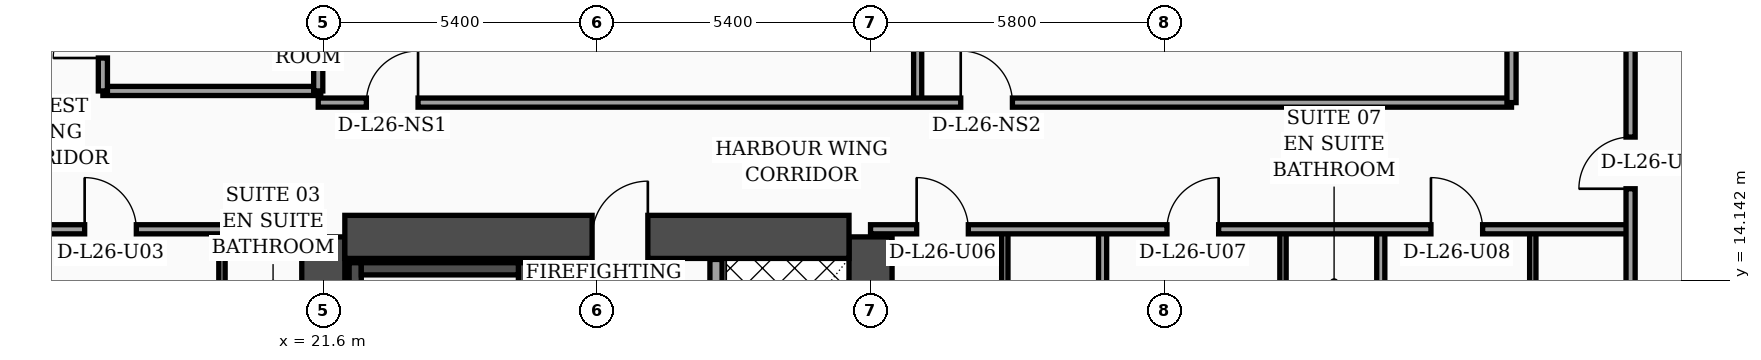
"""IFC4 building model, lengths in metres.
Left out: names, types, materials, properties, quantities, classifications, styles, units other than length and angle.
Written with IfcOpenShell. Run it as: python <this file> out.ifc"""

import sys

from ifc_helpers import new_model, si_unit, direction, frame, frame_2d, origin, place, context, subcontext, project, spatial, rectangle, extrude, element, fill, save


model = new_model("IFC4")
c1 = context("Model", 3, precision=1e-05, world=origin(), true_north=direction((0.0, 1.0)))
c2 = subcontext(c1, "Body", "Model", "MODEL_VIEW")
j1 = project(units=[si_unit("LENGTHUNIT", "METRE"), si_unit("PLANEANGLEUNIT", "RADIAN")], contexts=[c1])
p1 = place(None, origin())
s1 = spatial("IfcSite", under=j1, at=p1, CompositionType="ELEMENT")
p2 = place(p1, origin())
s2 = spatial("IfcBuilding", under=s1, at=p2, CompositionType="ELEMENT")
p3 = place(p2, frame((0.0, 0.0, 108.8)))
s3 = spatial("IfcBuildingStorey", under=s2, at=p3, CompositionType="ELEMENT", Elevation=108.8)
for number, where, z_axis, x_axis in (
    (1, (21.6, 4.6, 0.0), (0.0, 0.0, 1.0), (0.0, 1.0, 0.0)),
    (2, (32.4, 4.6, 0.0), (0.0, 0.0, 1.0), (0.0, 1.0, 0.0)),
):
    element("IfcWall", number, at=place(p3, frame(where, z_axis=z_axis, x_axis=x_axis)), inside=s3, PredefinedType="SHEAR", context=c2, shape_type="SweptSolid", body=[
        extrude(rectangle(XDim=10.4, YDim=0.85, at=frame_2d((5.2, 0.0))), origin(), (0.0, 0.0, 1.0), 3.56),
    ])
p4 = place(p3, frame((22.025, 15.0, 0.0), z_axis=(0.0, 0.0, 1.0), x_axis=(1.0, 0.0, 0.0)))
e3 = element("IfcWall", 3, at=p4, inside=s3, PredefinedType="SHEAR", context=c2, shape_type="SweptSolid", body=[
    extrude(rectangle(XDim=9.95, YDim=0.85, at=frame_2d((4.975, 0.0))), origin(), (0.0, 0.0, 1.0), 3.56),
])
p5 = place(p4, frame((4.88, 0.0, 0.0)))
e4 = element("IfcOpeningElement", 4, at=p5, cuts=e3, PredefinedType="OPENING", context=c2, shape_type="SweptSolid", body=[
    extrude(rectangle(XDim=1.1, YDim=2.2, at=frame_2d((0.55, 1.1))), frame((0.0, 0.435, 0.0), z_axis=(0.0, -1.0, 0.0), x_axis=(1.0, 0.0, 0.0)), (0.0, 0.0, 1.0), 0.87),
])
p6 = place(p3, frame((22.23, 5.025, 0.0), z_axis=(0.0, 0.0, 1.0), x_axis=(0.0, 1.0, 0.0)))
e5 = element("IfcWall", 5, at=p6, inside=s3, PredefinedType="SOLIDWALL", context=c2, shape_type="SweptSolid", body=[
    extrude(rectangle(XDim=9.465, YDim=0.24, at=frame_2d((4.732, 0.0))), origin(), (0.0, 0.0, 1.0), 3.56),
])
p7 = place(p3, frame((25.57, 5.025, 0.0), z_axis=(0.0, 0.0, 1.0), x_axis=(0.0, 1.0, 0.0)))
e6 = element("IfcWall", 6, at=p7, inside=s3, PredefinedType="SOLIDWALL", context=c2, shape_type="SweptSolid", body=[
    extrude(rectangle(XDim=9.465, YDim=0.24, at=frame_2d((4.732, 0.0))), origin(), (0.0, 0.0, 1.0), 3.56),
])
p8 = place(p7, frame((0.35, 0.0, 0.0)))
e7 = element("IfcOpeningElement", 7, at=p8, cuts=e6, PredefinedType="OPENING", context=c2, shape_type="SweptSolid", body=[
    extrude(rectangle(XDim=1.15, YDim=2.2, at=frame_2d((0.575, 1.1))), frame((0.0, 0.13, 0.0), z_axis=(0.0, -1.0, 0.0), x_axis=(1.0, 0.0, 0.0)), (0.0, 0.0, 1.0), 0.26),
])
p9 = place(p3, frame((22.35, 14.37, 0.0), z_axis=(0.0, 0.0, 1.0), x_axis=(1.0, 0.0, 0.0)))
e8 = element("IfcWall", 8, at=p9, inside=s3, PredefinedType="SOLIDWALL", context=c2, shape_type="SweptSolid", body=[
    extrude(rectangle(XDim=3.1, YDim=0.24, at=frame_2d((1.55, 0.0))), origin(), (0.0, 0.0, 1.0), 3.56),
])
p10 = place(p3, frame((29.35, 5.045, 0.0), z_axis=(0.0, 0.0, 1.0), x_axis=(0.0, 1.0, 0.0)))
e9 = element("IfcWall", 9, at=p10, inside=s3, PredefinedType="SOLIDWALL", context=c2, shape_type="SweptSolid", body=[
    extrude(rectangle(XDim=9.51, YDim=0.24, at=frame_2d((4.755, 0.0))), origin(), (0.0, 0.0, 1.0), 3.56),
])
p11 = place(p10, frame((0.55, 0.0, 0.0)))
e10 = element("IfcOpeningElement", 10, at=p11, cuts=e9, PredefinedType="OPENING", context=c2, shape_type="SweptSolid", body=[
    extrude(rectangle(XDim=1.3, YDim=2.35, at=frame_2d((0.65, 1.175))), frame((0.0, 0.13, 0.0), z_axis=(0.0, -1.0, 0.0), x_axis=(1.0, 0.0, 0.0)), (0.0, 0.0, 1.0), 0.26),
])
p12 = place(p3, frame((19.6, 2.44, 0.0), z_axis=(0.0, 0.0, 1.0), x_axis=(0.0, 1.0, 0.0)))
e11 = element("IfcWall", 11, at=p12, inside=s3, PredefinedType="PARTITIONING", context=c2, shape_type="SweptSolid", body=[
    extrude(rectangle(XDim=12.71, YDim=0.125, at=frame_2d((6.355, 0.0))), origin(), (0.0, 0.0, 1.0), 2.49),
])
p13 = place(p12, frame((4.34, 0.0, 0.0)))
e12 = element("IfcOpeningElement", 12, at=p13, cuts=e11, PredefinedType="OPENING", context=c2, shape_type="SweptSolid", body=[
    extrude(rectangle(XDim=0.96, YDim=2.2, at=frame_2d((0.48, 1.1))), frame((0.0, 0.073, 0.0), z_axis=(0.0, -1.0, 0.0), x_axis=(1.0, 0.0, 0.0)), (0.0, 0.0, 1.0), 0.145),
])
p14 = place(p12, frame((10.18, 0.0, 0.0)))
e13 = element("IfcOpeningElement", 13, at=p14, cuts=e11, PredefinedType="OPENING", context=c2, shape_type="SweptSolid", body=[
    extrude(rectangle(XDim=0.9, YDim=2.15, at=frame_2d((0.45, 1.075))), frame((0.0, 0.073, 0.0), z_axis=(0.0, -1.0, 0.0), x_axis=(1.0, 0.0, 0.0)), (0.0, 0.0, 1.0), 0.145),
])
p15 = place(p3, frame((15.15, 15.15, 0.0), z_axis=(0.0, 0.0, 1.0), x_axis=(1.0, 0.0, 0.0)))
e14 = element("IfcWall", 14, at=p15, inside=s3, PredefinedType="PARTITIONING", context=c2, shape_type="SweptSolid", body=[
    extrude(rectangle(XDim=6.45, YDim=0.18, at=frame_2d((3.225, 0.0))), origin(), (0.0, 0.0, 1.0), 2.49),
])
p16 = place(p15, frame((1.74, 0.0, 0.0)))
e15 = element("IfcOpeningElement", 15, at=p16, cuts=e14, PredefinedType="OPENING", context=c2, shape_type="SweptSolid", body=[
    extrude(rectangle(XDim=1.02, YDim=2.2, at=frame_2d((0.51, 1.1))), frame((0.0, 0.1, 0.0), z_axis=(0.0, -1.0, 0.0), x_axis=(1.0, 0.0, 0.0)), (0.0, 0.0, 1.0), 0.2),
])
p17 = place(p3, frame((17.25, 17.88, 0.0), z_axis=(0.0, 0.0, 1.0), x_axis=(1.0, 0.0, 0.0)))
e16 = element("IfcWall", 16, at=p17, inside=s3, PredefinedType="PARTITIONING", context=c2, shape_type="SweptSolid", body=[
    extrude(rectangle(XDim=4.3, YDim=0.18, at=frame_2d((2.15, 0.0))), origin(), (0.0, 0.0, 1.0), 3.56),
])
p18 = place(p3, frame((21.5, 17.88, 0.0), z_axis=(0.0, 0.0, 1.0), x_axis=(0.0, 1.0, 0.0)))
e17 = element("IfcWall", 17, at=p18, inside=s3, PredefinedType="PARTITIONING", context=c2, shape_type="SweptSolid", body=[
    extrude(rectangle(XDim=6.44, YDim=0.18, at=frame_2d((3.22, 0.0))), origin(), (0.0, 0.0, 1.0), 3.09),
])
p19 = place(p3, frame((17.25, 17.88, 0.0), z_axis=(0.0, 0.0, 1.0), x_axis=(0.0, 1.0, 0.0)))
e18 = element("IfcWall", 18, at=p19, inside=s3, PredefinedType="PARTITIONING", context=c2, shape_type="SweptSolid", body=[
    extrude(rectangle(XDim=6.44, YDim=0.18, at=frame_2d((3.22, 0.0))), origin(), (0.0, 0.0, 1.0), 3.09),
])
p20 = place(p19, frame((0.65, 0.0, 0.0)))
e19 = element("IfcOpeningElement", 19, at=p20, cuts=e18, PredefinedType="OPENING", context=c2, shape_type="SweptSolid", body=[
    extrude(rectangle(XDim=0.98, YDim=2.15, at=frame_2d((0.49, 1.075))), frame((0.0, 0.1, 0.0), z_axis=(0.0, -1.0, 0.0), x_axis=(1.0, 0.0, 0.0)), (0.0, 0.0, 1.0), 0.2),
])
p21 = place(p19, frame((3.27, 0.0, 0.0)))
e20 = element("IfcOpeningElement", 20, at=p21, cuts=e18, PredefinedType="OPENING", context=c2, shape_type="SweptSolid", body=[
    extrude(rectangle(XDim=0.96, YDim=2.2, at=frame_2d((0.48, 1.1))), frame((0.0, 0.1, 0.0), z_axis=(0.0, -1.0, 0.0), x_axis=(1.0, 0.0, 0.0)), (0.0, 0.0, 1.0), 0.2),
])
p22 = place(p3, frame((35.05, 2.44, 0.0), z_axis=(0.0, 0.0, 1.0), x_axis=(0.0, 1.0, 0.0)))
e21 = element("IfcWall", 21, at=p22, inside=s3, PredefinedType="PARTITIONING", context=c2, shape_type="SweptSolid", body=[
    extrude(rectangle(XDim=12.71, YDim=0.125, at=frame_2d((6.355, 0.0))), origin(), (0.0, 0.0, 1.0), 2.84),
])
p23 = place(p22, frame((4.35, 0.0, 0.0)))
e22 = element("IfcOpeningElement", 22, at=p23, cuts=e21, PredefinedType="OPENING", context=c2, shape_type="SweptSolid", body=[
    extrude(rectangle(XDim=0.96, YDim=2.2, at=frame_2d((0.48, 1.1))), frame((0.0, 0.073, 0.0), z_axis=(0.0, -1.0, 0.0), x_axis=(1.0, 0.0, 0.0)), (0.0, 0.0, 1.0), 0.145),
])
p24 = place(p22, frame((10.21, 0.0, 0.0)))
e23 = element("IfcOpeningElement", 23, at=p24, cuts=e21, PredefinedType="OPENING", context=c2, shape_type="SweptSolid", body=[
    extrude(rectangle(XDim=0.9, YDim=2.15, at=frame_2d((0.45, 1.075))), frame((0.0, 0.073, 0.0), z_axis=(0.0, -1.0, 0.0), x_axis=(1.0, 0.0, 0.0)), (0.0, 0.0, 1.0), 0.145),
])
p25 = place(p3, frame((40.54, 2.44, 0.0), z_axis=(0.0, 0.0, 1.0), x_axis=(0.0, 1.0, 0.0)))
e24 = element("IfcWall", 24, at=p25, inside=s3, PredefinedType="PARTITIONING", context=c2, shape_type="SweptSolid", body=[
    extrude(rectangle(XDim=12.71, YDim=0.125, at=frame_2d((6.355, 0.0))), origin(), (0.0, 0.0, 1.0), 2.84),
])
p26 = place(p25, frame((4.35, 0.0, 0.0)))
e25 = element("IfcOpeningElement", 25, at=p26, cuts=e24, PredefinedType="OPENING", context=c2, shape_type="SweptSolid", body=[
    extrude(rectangle(XDim=0.96, YDim=2.2, at=frame_2d((0.48, 1.1))), frame((0.0, 0.073, 0.0), z_axis=(0.0, -1.0, 0.0), x_axis=(1.0, 0.0, 0.0)), (0.0, 0.0, 1.0), 0.145),
])
p27 = place(p25, frame((10.21, 0.0, 0.0)))
e26 = element("IfcOpeningElement", 26, at=p27, cuts=e24, PredefinedType="OPENING", context=c2, shape_type="SweptSolid", body=[
    extrude(rectangle(XDim=0.9, YDim=2.15, at=frame_2d((0.45, 1.075))), frame((0.0, 0.073, 0.0), z_axis=(0.0, -1.0, 0.0), x_axis=(1.0, 0.0, 0.0)), (0.0, 0.0, 1.0), 0.145),
])
p28 = place(p3, frame((36.98, 2.44, 0.0), z_axis=(0.0, 0.0, 1.0), x_axis=(0.0, 1.0, 0.0)))
e27 = element("IfcWall", 27, at=p28, inside=s3, PredefinedType="PARTITIONING", context=c2, shape_type="SweptSolid", body=[
    extrude(rectangle(XDim=12.71, YDim=0.16, at=frame_2d((6.355, 0.0))), origin(), (0.0, 0.0, 1.0), 2.84),
])
p29 = place(p3, frame((45.47, 2.44, 0.0), z_axis=(0.0, 0.0, 1.0), x_axis=(0.0, 1.0, 0.0)))
e28 = element("IfcWall", 28, at=p29, inside=s3, PredefinedType="PARTITIONING", context=c2, shape_type="SweptSolid", body=[
    extrude(rectangle(XDim=12.71, YDim=0.125, at=frame_2d((6.355, 0.0))), origin(), (0.0, 0.0, 1.0), 3.04),
])
p30 = place(p29, frame((4.35, 0.0, 0.0)))
e29 = element("IfcOpeningElement", 29, at=p30, cuts=e28, PredefinedType="OPENING", context=c2, shape_type="SweptSolid", body=[
    extrude(rectangle(XDim=0.96, YDim=2.2, at=frame_2d((0.48, 1.1))), frame((0.0, 0.073, 0.0), z_axis=(0.0, -1.0, 0.0), x_axis=(1.0, 0.0, 0.0)), (0.0, 0.0, 1.0), 0.145),
])
p31 = place(p29, frame((10.21, 0.0, 0.0)))
e30 = element("IfcOpeningElement", 30, at=p31, cuts=e28, PredefinedType="OPENING", context=c2, shape_type="SweptSolid", body=[
    extrude(rectangle(XDim=0.9, YDim=2.15, at=frame_2d((0.45, 1.075))), frame((0.0, 0.073, 0.0), z_axis=(0.0, -1.0, 0.0), x_axis=(1.0, 0.0, 0.0)), (0.0, 0.0, 1.0), 0.145),
])
p32 = place(p3, frame((42.47, 2.44, 0.0), z_axis=(0.0, 0.0, 1.0), x_axis=(0.0, 1.0, 0.0)))
e31 = element("IfcWall", 31, at=p32, inside=s3, PredefinedType="PARTITIONING", context=c2, shape_type="SweptSolid", body=[
    extrude(rectangle(XDim=12.71, YDim=0.16, at=frame_2d((6.355, 0.0))), origin(), (0.0, 0.0, 1.0), 3.04),
])
p33 = place(p3, frame((32.4, 15.15, 0.0), z_axis=(0.0, 0.0, 1.0), x_axis=(1.0, 0.0, 0.0)))
e32 = element("IfcWall", 32, at=p33, inside=s3, PredefinedType="PARTITIONING", context=c2, shape_type="SweptSolid", body=[
    extrude(rectangle(XDim=15.0, YDim=0.18, at=frame_2d((7.5, 0.0))), origin(), (0.0, 0.0, 1.0), 2.84),
])
p34 = place(p33, frame((0.91, 0.0, 0.0)))
e33 = element("IfcOpeningElement", 33, at=p34, cuts=e32, PredefinedType="OPENING", context=c2, shape_type="SweptSolid", body=[
    extrude(rectangle(XDim=1.02, YDim=2.2, at=frame_2d((0.51, 1.1))), frame((0.0, 0.1, 0.0), z_axis=(0.0, -1.0, 0.0), x_axis=(1.0, 0.0, 0.0)), (0.0, 0.0, 1.0), 0.2),
])
p35 = place(p33, frame((5.85, 0.0, 0.0)))
e34 = element("IfcOpeningElement", 34, at=p35, cuts=e32, PredefinedType="OPENING", context=c2, shape_type="SweptSolid", body=[
    extrude(rectangle(XDim=1.02, YDim=2.2, at=frame_2d((0.51, 1.1))), frame((0.0, 0.1, 0.0), z_axis=(0.0, -1.0, 0.0), x_axis=(1.0, 0.0, 0.0)), (0.0, 0.0, 1.0), 0.2),
])
p36 = place(p33, frame((11.06, 0.0, 0.0)))
e35 = element("IfcOpeningElement", 35, at=p36, cuts=e32, PredefinedType="OPENING", context=c2, shape_type="SweptSolid", body=[
    extrude(rectangle(XDim=1.02, YDim=2.2, at=frame_2d((0.51, 1.1))), frame((0.0, 0.1, 0.0), z_axis=(0.0, -1.0, 0.0), x_axis=(1.0, 0.0, 0.0)), (0.0, 0.0, 1.0), 0.2),
])
p37 = place(p3, frame((33.33, 17.65, 0.0), z_axis=(0.0, 0.0, 1.0), x_axis=(0.0, 1.0, 0.0)))
e36 = element("IfcWall", 36, at=p37, inside=s3, PredefinedType="PARTITIONING", context=c2, shape_type="SweptSolid", body=[
    extrude(rectangle(XDim=13.37, YDim=0.16, at=frame_2d((6.685, 0.0))), origin(), (0.0, 0.0, 1.0), 2.84),
])
p38 = place(p3, frame((21.5, 17.65, 0.0), z_axis=(0.0, 0.0, 1.0), x_axis=(1.0, 0.0, 0.0)))
e37 = element("IfcWall", 37, at=p38, inside=s3, PredefinedType="PARTITIONING", context=c2, shape_type="SweptSolid", body=[
    extrude(rectangle(XDim=23.55, YDim=0.18, at=frame_2d((11.775, 0.0))), origin(), (0.0, 0.0, 1.0), 2.84),
])
p39 = place(p38, frame((0.95, 0.0, 0.0)))
e38 = element("IfcOpeningElement", 38, at=p39, cuts=e37, PredefinedType="OPENING", context=c2, shape_type="SweptSolid", body=[
    extrude(rectangle(XDim=1.02, YDim=2.2, at=frame_2d((0.51, 1.1))), frame((0.0, 0.1, 0.0), z_axis=(0.0, -1.0, 0.0), x_axis=(1.0, 0.0, 0.0)), (0.0, 0.0, 1.0), 0.2),
])
p40 = place(p38, frame((12.68, 0.0, 0.0)))
e39 = element("IfcOpeningElement", 39, at=p40, cuts=e37, PredefinedType="OPENING", context=c2, shape_type="SweptSolid", body=[
    extrude(rectangle(XDim=1.02, YDim=2.2, at=frame_2d((0.51, 1.1))), frame((0.0, 0.1, 0.0), z_axis=(0.0, -1.0, 0.0), x_axis=(1.0, 0.0, 0.0)), (0.0, 0.0, 1.0), 0.2),
])
p41 = place(p3, frame((45.05, 17.65, 0.0), z_axis=(0.0, 0.0, 1.0), x_axis=(0.0, 1.0, 0.0)))
e40 = element("IfcWall", 40, at=p41, inside=s3, PredefinedType="PARTITIONING", context=c2, shape_type="SweptSolid", body=[
    extrude(rectangle(XDim=19.9, YDim=0.18, at=frame_2d((9.95, 0.0))), origin(), (0.0, 0.0, 1.0), 2.84),
])
p42 = place(p3, frame((47.4, 2.44, 0.0), z_axis=(0.0, 0.0, 1.0), x_axis=(0.0, 1.0, 0.0)))
e41 = element("IfcWall", 41, at=p42, inside=s3, PredefinedType="PARTITIONING", context=c2, shape_type="SweptSolid", body=[
    extrude(rectangle(XDim=27.84, YDim=0.18, at=frame_2d((13.92, 0.0))), origin(), (0.0, 0.0, 1.0), 2.84),
])
p43 = place(p42, frame((13.51, 0.0, 0.0)))
e42 = element("IfcOpeningElement", 42, at=p43, cuts=e41, PredefinedType="OPENING", context=c2, shape_type="SweptSolid", body=[
    extrude(rectangle(XDim=1.02, YDim=2.2, at=frame_2d((0.51, 1.1))), frame((0.0, 0.1, 0.0), z_axis=(0.0, -1.0, 0.0), x_axis=(1.0, 0.0, 0.0)), (0.0, 0.0, 1.0), 0.2),
])
p44 = place(p42, frame((21.52, 0.0, 0.0)))
e43 = element("IfcOpeningElement", 43, at=p44, cuts=e41, PredefinedType="OPENING", context=c2, shape_type="SweptSolid", body=[
    extrude(rectangle(XDim=1.02, YDim=2.2, at=frame_2d((0.51, 1.1))), frame((0.0, 0.1, 0.0), z_axis=(0.0, -1.0, 0.0), x_axis=(1.0, 0.0, 0.0)), (0.0, 0.0, 1.0), 0.2),
])
p45 = place(p16, origin())
e44 = element("IfcDoor", 44, at=p45, inside=s3, OperationType="SINGLE_SWING_LEFT", PredefinedType="DOOR", context=c2, shape_type="SweptSolid", body=[
    extrude(rectangle(XDim=1.02, YDim=2.2, at=frame_2d((0.51, 1.1))), frame((0.0, 0.025, 0.0), z_axis=(0.0, -1.0, 0.0), x_axis=(1.0, 0.0, 0.0)), (0.0, 0.0, 1.0), 0.05),
])
fill(e15, e44)
p46 = place(p20, origin())
e45 = element("IfcDoor", 45, at=p46, inside=s3, OperationType="SINGLE_SWING_LEFT", PredefinedType="DOOR", context=c2, shape_type="SweptSolid", body=[
    extrude(rectangle(XDim=0.98, YDim=2.15, at=frame_2d((0.49, 1.075))), frame((0.0, 0.025, 0.0), z_axis=(0.0, -1.0, 0.0), x_axis=(1.0, 0.0, 0.0)), (0.0, 0.0, 1.0), 0.05),
])
fill(e19, e45)
p47 = place(p34, origin())
e46 = element("IfcDoor", 46, at=p47, inside=s3, OperationType="SINGLE_SWING_LEFT", PredefinedType="DOOR", context=c2, shape_type="SweptSolid", body=[
    extrude(rectangle(XDim=1.02, YDim=2.2, at=frame_2d((0.51, 1.1))), frame((0.0, 0.025, 0.0), z_axis=(0.0, -1.0, 0.0), x_axis=(1.0, 0.0, 0.0)), (0.0, 0.0, 1.0), 0.05),
])
fill(e33, e46)
p48 = place(p35, origin())
e47 = element("IfcDoor", 47, at=p48, inside=s3, OperationType="SINGLE_SWING_RIGHT", PredefinedType="DOOR", context=c2, shape_type="SweptSolid", body=[
    extrude(rectangle(XDim=1.02, YDim=2.2, at=frame_2d((0.51, 1.1))), frame((0.0, 0.025, 0.0), z_axis=(0.0, -1.0, 0.0), x_axis=(1.0, 0.0, 0.0)), (0.0, 0.0, 1.0), 0.05),
])
fill(e34, e47)
p49 = place(p36, origin())
e48 = element("IfcDoor", 48, at=p49, inside=s3, OperationType="SINGLE_SWING_LEFT", PredefinedType="DOOR", context=c2, shape_type="SweptSolid", body=[
    extrude(rectangle(XDim=1.02, YDim=2.2, at=frame_2d((0.51, 1.1))), frame((0.0, 0.025, 0.0), z_axis=(0.0, -1.0, 0.0), x_axis=(1.0, 0.0, 0.0)), (0.0, 0.0, 1.0), 0.05),
])
fill(e35, e48)
p50 = place(p39, origin())
e49 = element("IfcDoor", 49, at=p50, inside=s3, OperationType="SINGLE_SWING_RIGHT", PredefinedType="DOOR", context=c2, shape_type="SweptSolid", body=[
    extrude(rectangle(XDim=1.02, YDim=2.2, at=frame_2d((0.51, 1.1))), frame((0.0, 0.025, 0.0), z_axis=(0.0, -1.0, 0.0), x_axis=(1.0, 0.0, 0.0)), (0.0, 0.0, 1.0), 0.05),
])
fill(e38, e49)
p51 = place(p40, origin())
e50 = element("IfcDoor", 50, at=p51, inside=s3, OperationType="SINGLE_SWING_LEFT", PredefinedType="DOOR", context=c2, shape_type="SweptSolid", body=[
    extrude(rectangle(XDim=1.02, YDim=2.2, at=frame_2d((0.51, 1.1))), frame((0.0, 0.025, 0.0), z_axis=(0.0, -1.0, 0.0), x_axis=(1.0, 0.0, 0.0)), (0.0, 0.0, 1.0), 0.05),
])
fill(e39, e50)
p52 = place(p43, origin())
e51 = element("IfcDoor", 51, at=p52, inside=s3, OperationType="SINGLE_SWING_LEFT", PredefinedType="DOOR", context=c2, shape_type="SweptSolid", body=[
    extrude(rectangle(XDim=1.02, YDim=2.2, at=frame_2d((0.51, 1.1))), frame((0.0, 0.025, 0.0), z_axis=(0.0, -1.0, 0.0), x_axis=(1.0, 0.0, 0.0)), (0.0, 0.0, 1.0), 0.05),
])
fill(e42, e51)
p53 = place(p5, origin())
e52 = element("IfcDoor", 52, at=p53, inside=s3, OperationType="SINGLE_SWING_RIGHT", PredefinedType="DOOR", context=c2, shape_type="SweptSolid", body=[
    extrude(rectangle(XDim=1.1, YDim=2.2, at=frame_2d((0.55, 1.1))), frame((0.0, 0.025, 0.0), z_axis=(0.0, -1.0, 0.0), x_axis=(1.0, 0.0, 0.0)), (0.0, 0.0, 1.0), 0.05),
])
fill(e4, e52)
save(model, sys.argv[1])
